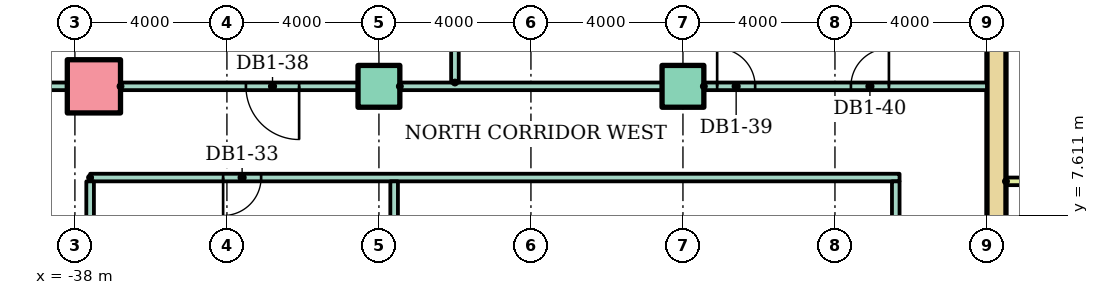
"""IFC4 building model, lengths in metres.
Left out: names, types, materials, properties, quantities, classifications, styles, units other than length and angle.
Written with IfcOpenShell. Run it as: python <this file> out.ifc"""

import sys

from ifc_helpers import new_model, si_unit, direction, frame, frame_2d, origin, origin_2d, place, context, subcontext, project, spatial, rectangle, hollow_rectangle, extrude, element, fill, save


model = new_model("IFC4")
c1 = context("Model", 3, precision=1e-05, world=origin(), true_north=direction((0.0, 1.0)))
c2 = subcontext(c1, "Body", "Model", "MODEL_VIEW")
j1 = project(units=[si_unit("LENGTHUNIT", "METRE"), si_unit("PLANEANGLEUNIT", "RADIAN")], contexts=[c1])
p1 = place(None, origin())
s1 = spatial("IfcSite", under=j1, at=p1, CompositionType="ELEMENT")
p2 = place(p1, origin())
s2 = spatial("IfcBuilding", under=s1, at=p2, CompositionType="ELEMENT")
p3 = place(p2, frame((0.0, 0.0, -5.0)))
s3 = spatial("IfcBuildingStorey", under=s2, at=p3, CompositionType="ELEMENT", Elevation=-5.0)
p4 = place(p3, frame((-37.5, 11.0, 0.0)))
e1 = element("IfcColumn", 1, at=p4, inside=s3, PredefinedType="COLUMN", context=c2, shape_type="SweptSolid", body=[
    extrude(hollow_rectangle(XDim=1.4, YDim=1.4, WallThickness=0.08, at=origin_2d()), origin(), (0.0, 0.0, 1.0), 5.0),
])
for number, where in (
    (2, (-30.0, 11.0, 0.0)),
    (3, (-22.0, 11.0, 0.0)),
):
    element("IfcColumn", number, at=place(p3, frame(where)), inside=s3, PredefinedType="COLUMN", context=c2, shape_type="SweptSolid", body=[
        extrude(rectangle(XDim=1.1, YDim=1.1, at=origin_2d()), origin(), (0.0, 0.0, 1.0), 5.0),
    ])
p5 = place(p3, frame((-13.75, 3.0, 0.0), z_axis=(0.0, 0.0, 1.0), x_axis=(0.0, 1.0, 0.0)))
e4 = element("IfcWall", 4, at=p5, inside=s3, PredefinedType="SHEAR", context=c2, shape_type="SweptSolid", body=[
    extrude(rectangle(XDim=17.4, YDim=0.5, at=frame_2d((8.7, 0.0))), origin(), (0.0, 0.0, 1.0), 4.58),
])
p6 = place(p3, frame((-13.5, 8.5, 0.0)))
e5 = element("IfcWall", 5, at=p6, inside=s3, PredefinedType="PARTITIONING", context=c2, shape_type="SweptSolid", body=[
    extrude(rectangle(XDim=3.9, YDim=0.2, at=frame_2d((1.95, 0.0))), origin(), (0.0, 0.0, 1.0), 4.58),
])
p7 = place(p3, frame((-37.6, 8.6, 0.0)))
e6 = element("IfcWall", 6, at=p7, inside=s3, PredefinedType="PARTITIONING", context=c2, shape_type="SweptSolid", body=[
    extrude(rectangle(XDim=21.3, YDim=0.2, at=frame_2d((10.65, 0.0))), origin(), (0.0, 0.0, 1.0), 4.58),
])
p8 = place(p7, frame((3.5, 0.0, 0.0)))
e7 = element("IfcOpeningElement", 7, at=p8, cuts=e6, PredefinedType="OPENING", context=c2, shape_type="SweptSolid", body=[
    extrude(rectangle(XDim=1.0, YDim=2.1, at=frame_2d((0.5, 1.05))), frame((0.0, 0.11, 0.0), z_axis=(0.0, -1.0, 0.0), x_axis=(1.0, 0.0, 0.0)), (0.0, 0.0, 1.0), 0.22),
])
p9 = place(p3, frame((-39.6, 11.0, 0.0)))
e8 = element("IfcWall", 8, at=p9, inside=s3, PredefinedType="PARTITIONING", context=c2, shape_type="SweptSolid", body=[
    extrude(rectangle(XDim=1.4, YDim=0.2, at=frame_2d((0.7, 0.0))), origin(), (0.0, 0.0, 1.0), 4.58),
])
p10 = place(p3, frame((-36.8, 11.0, 0.0)))
e9 = element("IfcWall", 9, at=p10, inside=s3, PredefinedType="PARTITIONING", context=c2, shape_type="SweptSolid", body=[
    extrude(rectangle(XDim=6.25, YDim=0.2, at=frame_2d((3.125, 0.0))), origin(), (0.0, 0.0, 1.0), 4.58),
])
p11 = place(p10, frame((3.3, 0.0, 0.0)))
e10 = element("IfcOpeningElement", 10, at=p11, cuts=e9, PredefinedType="OPENING", context=c2, shape_type="SweptSolid", body=[
    extrude(rectangle(XDim=1.4, YDim=2.1, at=frame_2d((0.7, 1.05))), frame((0.0, 0.11, 0.0), z_axis=(0.0, -1.0, 0.0), x_axis=(1.0, 0.0, 0.0)), (0.0, 0.0, 1.0), 0.22),
])
p12 = place(p3, frame((-29.45, 11.0, 0.0)))
e11 = element("IfcWall", 11, at=p12, inside=s3, PredefinedType="PARTITIONING", context=c2, shape_type="SweptSolid", body=[
    extrude(rectangle(XDim=6.9, YDim=0.2, at=frame_2d((3.45, 0.0))), origin(), (0.0, 0.0, 1.0), 4.58),
])
p13 = place(p3, frame((-21.45, 11.0, 0.0)))
e12 = element("IfcWall", 12, at=p13, inside=s3, PredefinedType="PARTITIONING", context=c2, shape_type="SweptSolid", body=[
    extrude(rectangle(XDim=7.45, YDim=0.2, at=frame_2d((3.725, 0.0))), origin(), (0.0, 0.0, 1.0), 4.58),
])
p14 = place(p13, frame((0.35, 0.0, 0.0)))
e13 = element("IfcOpeningElement", 13, at=p14, cuts=e12, PredefinedType="OPENING", context=c2, shape_type="SweptSolid", body=[
    extrude(rectangle(XDim=1.0, YDim=2.1, at=frame_2d((0.5, 1.05))), frame((0.0, 0.11, 0.0), z_axis=(0.0, -1.0, 0.0), x_axis=(1.0, 0.0, 0.0)), (0.0, 0.0, 1.0), 0.22),
])
p15 = place(p13, frame((3.87, 0.0, 0.0)))
e14 = element("IfcOpeningElement", 14, at=p15, cuts=e12, PredefinedType="OPENING", context=c2, shape_type="SweptSolid", body=[
    extrude(rectangle(XDim=1.0, YDim=2.1, at=frame_2d((0.5, 1.05))), frame((0.0, 0.11, 0.0), z_axis=(0.0, -1.0, 0.0), x_axis=(1.0, 0.0, 0.0)), (0.0, 0.0, 1.0), 0.22),
])
p16 = place(p3, frame((-37.6, 2.7, 0.0), z_axis=(0.0, 0.0, 1.0), x_axis=(0.0, 1.0, 0.0)))
e15 = element("IfcWall", 15, at=p16, inside=s3, PredefinedType="PARTITIONING", context=c2, shape_type="SweptSolid", body=[
    extrude(rectangle(XDim=5.8, YDim=0.2, at=frame_2d((2.9, 0.0))), origin(), (0.0, 0.0, 1.0), 4.58),
])
p17 = place(p3, frame((-29.6, 2.55, 0.0), z_axis=(0.0, 0.0, 1.0), x_axis=(0.0, 1.0, 0.0)))
e16 = element("IfcWall", 16, at=p17, inside=s3, PredefinedType="PARTITIONING", context=c2, shape_type="SweptSolid", body=[
    extrude(rectangle(XDim=5.95, YDim=0.2, at=frame_2d((2.975, 0.0))), origin(), (0.0, 0.0, 1.0), 4.58),
])
p18 = place(p3, frame((-28.0, 11.1, 0.0), z_axis=(0.0, 0.0, 1.0), x_axis=(0.0, 1.0, 0.0)))
e17 = element("IfcWall", 17, at=p18, inside=s3, PredefinedType="PARTITIONING", context=c2, shape_type="SweptSolid", body=[
    extrude(rectangle(XDim=8.5, YDim=0.2, at=frame_2d((4.25, 0.0))), origin(), (0.0, 0.0, 1.0), 4.58),
])
p19 = place(p3, frame((-16.4, 1.5, 0.0), z_axis=(0.0, 0.0, 1.0), x_axis=(0.0, 1.0, 0.0)))
e18 = element("IfcWall", 18, at=p19, inside=s3, PredefinedType="PARTITIONING", context=c2, shape_type="SweptSolid", body=[
    extrude(rectangle(XDim=7.0, YDim=0.2, at=frame_2d((3.5, 0.0))), origin(), (0.0, 0.0, 1.0), 4.58),
])
p20 = place(p8, frame((1.0, 0.0, 0.0), z_axis=(0.0, 0.0, 1.0), x_axis=(-1.0, 0.0, 0.0)))
e19 = element("IfcDoor", 19, at=p20, inside=s3, OperationType="SINGLE_SWING_LEFT", PredefinedType="DOOR", context=c2, shape_type="SweptSolid", body=[
    extrude(rectangle(XDim=1.0, YDim=2.1, at=frame_2d((0.5, 1.05))), frame((0.0, 0.025, 0.0), z_axis=(0.0, -1.0, 0.0), x_axis=(1.0, 0.0, 0.0)), (0.0, 0.0, 1.0), 0.05),
])
fill(e7, e19)
p21 = place(p11, frame((1.4, 0.0, 0.0), z_axis=(0.0, 0.0, 1.0), x_axis=(-1.0, 0.0, 0.0)))
e20 = element("IfcDoor", 20, at=p21, inside=s3, OperationType="DOUBLE_DOOR_SINGLE_SWING", PredefinedType="DOOR", context=c2, shape_type="SweptSolid", body=[
    extrude(rectangle(XDim=1.4, YDim=2.1, at=frame_2d((0.7, 1.05))), frame((0.0, 0.025, 0.0), z_axis=(0.0, -1.0, 0.0), x_axis=(1.0, 0.0, 0.0)), (0.0, 0.0, 1.0), 0.05),
])
fill(e10, e20)
p22 = place(p14, origin())
e21 = element("IfcDoor", 21, at=p22, inside=s3, OperationType="SINGLE_SWING_LEFT", PredefinedType="DOOR", context=c2, shape_type="SweptSolid", body=[
    extrude(rectangle(XDim=1.0, YDim=2.1, at=frame_2d((0.5, 1.05))), frame((0.0, 0.025, 0.0), z_axis=(0.0, -1.0, 0.0), x_axis=(1.0, 0.0, 0.0)), (0.0, 0.0, 1.0), 0.05),
])
fill(e13, e21)
p23 = place(p15, origin())
e22 = element("IfcDoor", 22, at=p23, inside=s3, OperationType="SINGLE_SWING_RIGHT", PredefinedType="DOOR", context=c2, shape_type="SweptSolid", body=[
    extrude(rectangle(XDim=1.0, YDim=2.1, at=frame_2d((0.5, 1.05))), frame((0.0, 0.025, 0.0), z_axis=(0.0, -1.0, 0.0), x_axis=(1.0, 0.0, 0.0)), (0.0, 0.0, 1.0), 0.05),
])
fill(e14, e22)
save(model, sys.argv[1])
